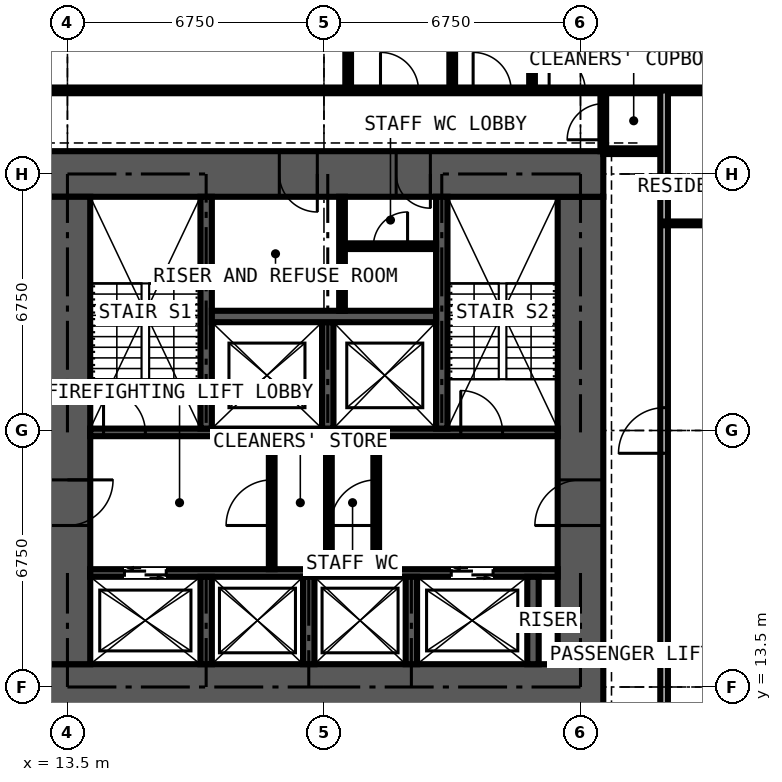
"""IFC4 building model, lengths in metres.
Left out: names, types, materials, properties, quantities, classifications, styles, units other than length and angle.
Written with IfcOpenShell. Run it as: python <this file> out.ifc"""

import sys

from ifc_helpers import new_model, si_unit, direction, frame, frame_2d, origin, place, context, subcontext, project, spatial, rectangle, extrude, element, fill, save


model = new_model("IFC4")
c1 = context("Model", 3, precision=1e-05, world=origin(), true_north=direction((0.0, 1.0)))
c2 = subcontext(c1, "Body", "Model", "MODEL_VIEW")
j1 = project(units=[si_unit("LENGTHUNIT", "METRE"), si_unit("PLANEANGLEUNIT", "RADIAN")], contexts=[c1])
p1 = place(None, origin())
s1 = spatial("IfcSite", under=j1, at=p1, CompositionType="ELEMENT")
p2 = place(p1, origin())
s2 = spatial("IfcBuilding", under=s1, at=p2, CompositionType="ELEMENT")
p3 = place(p2, frame((0.0, 0.0, 68.4)))
s3 = spatial("IfcBuildingStorey", under=s2, at=p3, CompositionType="ELEMENT", Elevation=68.4)
p4 = place(p3, frame((12.9, 13.5, 0.0), z_axis=(0.0, 0.0, 1.0), x_axis=(1.0, 0.0, 0.0)))
e1 = element("IfcWall", 1, at=p4, inside=s3, PredefinedType="SHEAR", context=c2, shape_type="SweptSolid", body=[
    extrude(rectangle(XDim=14.7, YDim=1.2, at=frame_2d((7.35, 0.0))), origin(), (0.0, 0.0, 1.0), 3.6),
])
p5 = place(p3, frame((27.0, 14.1, 0.0), z_axis=(0.0, 0.0, 1.0), x_axis=(0.0, 1.0, 0.0)))
e2 = element("IfcWall", 2, at=p5, inside=s3, PredefinedType="SHEAR", context=c2, shape_type="SweptSolid", body=[
    extrude(rectangle(XDim=12.3, YDim=1.2, at=frame_2d((6.15, 0.0))), origin(), (0.0, 0.0, 1.0), 3.6),
])
p6 = place(p5, frame((3.65, 0.0, 0.0)))
e3 = element("IfcOpeningElement", 3, at=p6, cuts=e2, PredefinedType="OPENING", context=c2, shape_type="SweptSolid", body=[
    extrude(rectangle(XDim=1.2, YDim=2.2, at=frame_2d((0.6, 1.1))), frame((0.0, 0.61, 0.0), z_axis=(0.0, -1.0, 0.0), x_axis=(1.0, 0.0, 0.0)), (0.0, 0.0, 1.0), 1.22),
])
p7 = place(p3, frame((27.6, 27.0, 0.0), z_axis=(0.0, 0.0, 1.0), x_axis=(-1.0, 0.0, 0.0)))
e4 = element("IfcWall", 4, at=p7, inside=s3, PredefinedType="SHEAR", context=c2, shape_type="SweptSolid", body=[
    extrude(rectangle(XDim=14.7, YDim=1.2, at=frame_2d((7.35, 0.0))), origin(), (0.0, 0.0, 1.0), 3.6),
])
p8 = place(p7, frame((4.55, 0.0, 0.0)))
e5 = element("IfcOpeningElement", 5, at=p8, cuts=e4, PredefinedType="OPENING", context=c2, shape_type="SweptSolid", body=[
    extrude(rectangle(XDim=0.9, YDim=2.2, at=frame_2d((0.45, 1.1))), frame((0.0, 0.61, 0.0), z_axis=(0.0, -1.0, 0.0), x_axis=(1.0, 0.0, 0.0)), (0.0, 0.0, 1.0), 1.22),
])
p9 = place(p7, frame((7.525, 0.0, 0.0)))
e6 = element("IfcOpeningElement", 6, at=p9, cuts=e4, PredefinedType="OPENING", context=c2, shape_type="SweptSolid", body=[
    extrude(rectangle(XDim=1.0, YDim=2.2, at=frame_2d((0.5, 1.1))), frame((0.0, 0.61, 0.0), z_axis=(0.0, -1.0, 0.0), x_axis=(1.0, 0.0, 0.0)), (0.0, 0.0, 1.0), 1.22),
])
p10 = place(p3, frame((13.5, 26.4, 0.0), z_axis=(0.0, 0.0, 1.0), x_axis=(0.0, -1.0, 0.0)))
e7 = element("IfcWall", 7, at=p10, inside=s3, PredefinedType="SHEAR", context=c2, shape_type="SweptSolid", body=[
    extrude(rectangle(XDim=12.3, YDim=1.2, at=frame_2d((6.15, 0.0))), origin(), (0.0, 0.0, 1.0), 3.6),
])
p11 = place(p10, frame((7.45, 0.0, 0.0)))
e8 = element("IfcOpeningElement", 8, at=p11, cuts=e7, PredefinedType="OPENING", context=c2, shape_type="SweptSolid", body=[
    extrude(rectangle(XDim=1.2, YDim=2.2, at=frame_2d((0.6, 1.1))), frame((0.0, 0.61, 0.0), z_axis=(0.0, -1.0, 0.0), x_axis=(1.0, 0.0, 0.0)), (0.0, 0.0, 1.0), 1.22),
])
p12 = place(p3, frame((14.1, 16.5, 0.0), z_axis=(0.0, 0.0, 1.0), x_axis=(1.0, 0.0, 0.0)))
e9 = element("IfcWall", 9, at=p12, inside=s3, PredefinedType="SHEAR", context=c2, shape_type="SweptSolid", body=[
    extrude(rectangle(XDim=12.3, YDim=0.2, at=frame_2d((6.15, 0.0))), origin(), (0.0, 0.0, 1.0), 3.6),
])
p13 = place(p12, frame((0.9, 0.0, 0.0)))
e10 = element("IfcOpeningElement", 10, at=p13, cuts=e9, PredefinedType="OPENING", context=c2, shape_type="SweptSolid", body=[
    extrude(rectangle(XDim=1.1, YDim=2.2, at=frame_2d((0.55, 1.1))), frame((0.0, 0.11, 0.0), z_axis=(0.0, -1.0, 0.0), x_axis=(1.0, 0.0, 0.0)), (0.0, 0.0, 1.0), 0.22),
])
p14 = place(p12, frame((9.5, 0.0, 0.0)))
e11 = element("IfcOpeningElement", 11, at=p14, cuts=e9, PredefinedType="OPENING", context=c2, shape_type="SweptSolid", body=[
    extrude(rectangle(XDim=1.1, YDim=2.2, at=frame_2d((0.55, 1.1))), frame((0.0, 0.11, 0.0), z_axis=(0.0, -1.0, 0.0), x_axis=(1.0, 0.0, 0.0)), (0.0, 0.0, 1.0), 0.22),
])
p15 = place(p3, frame((14.1, 20.2, 0.0), z_axis=(0.0, 0.0, 1.0), x_axis=(1.0, 0.0, 0.0)))
e12 = element("IfcWall", 12, at=p15, inside=s3, PredefinedType="SHEAR", context=c2, shape_type="SweptSolid", body=[
    extrude(rectangle(XDim=12.3, YDim=0.2, at=frame_2d((6.15, 0.0))), origin(), (0.0, 0.0, 1.0), 3.6),
])
p16 = place(p15, frame((0.35, 0.0, 0.0)))
e13 = element("IfcOpeningElement", 13, at=p16, cuts=e12, PredefinedType="OPENING", context=c2, shape_type="SweptSolid", body=[
    extrude(rectangle(XDim=1.1, YDim=2.2, at=frame_2d((0.55, 1.1))), frame((0.0, 0.11, 0.0), z_axis=(0.0, -1.0, 0.0), x_axis=(1.0, 0.0, 0.0)), (0.0, 0.0, 1.0), 0.22),
])
p17 = place(p15, frame((9.75, 0.0, 0.0)))
e14 = element("IfcOpeningElement", 14, at=p17, cuts=e12, PredefinedType="OPENING", context=c2, shape_type="SweptSolid", body=[
    extrude(rectangle(XDim=1.1, YDim=2.2, at=frame_2d((0.55, 1.1))), frame((0.0, 0.11, 0.0), z_axis=(0.0, -1.0, 0.0), x_axis=(1.0, 0.0, 0.0)), (0.0, 0.0, 1.0), 0.22),
])
for number, where, z_axis, x_axis in (
    (15, (17.15, 20.3, 0.0), (0.0, 0.0, 1.0), (0.0, 1.0, 0.0)),
    (16, (23.35, 20.3, 0.0), (0.0, 0.0, 1.0), (0.0, 1.0, 0.0)),
):
    element("IfcWall", number, at=place(p3, frame(where, z_axis=z_axis, x_axis=x_axis)), inside=s3, PredefinedType="SHEAR", context=c2, shape_type="SweptSolid", body=[
        extrude(rectangle(XDim=6.1, YDim=0.3, at=frame_2d((3.05, 0.0))), origin(), (0.0, 0.0, 1.0), 3.6),
    ])
p18 = place(p3, frame((20.35, 20.3, 0.0), z_axis=(0.0, 0.0, 1.0), x_axis=(0.0, 1.0, 0.0)))
e17 = element("IfcWall", 17, at=p18, inside=s3, PredefinedType="SHEAR", context=c2, shape_type="SweptSolid", body=[
    extrude(rectangle(XDim=2.8, YDim=0.3, at=frame_2d((1.4, 0.0))), origin(), (0.0, 0.0, 1.0), 3.6),
])
p19 = place(p3, frame((17.3, 23.25, 0.0), z_axis=(0.0, 0.0, 1.0), x_axis=(1.0, 0.0, 0.0)))
e18 = element("IfcWall", 18, at=p19, inside=s3, PredefinedType="SHEAR", context=c2, shape_type="SweptSolid", body=[
    extrude(rectangle(XDim=5.9, YDim=0.3, at=frame_2d((2.95, 0.0))), origin(), (0.0, 0.0, 1.0), 3.6),
])
for number, where, z_axis, x_axis in (
    (19, (17.15, 14.1, 0.0), (0.0, 0.0, 1.0), (0.0, 1.0, 0.0)),
    (20, (19.85, 14.1, 0.0), (0.0, 0.0, 1.0), (0.0, 1.0, 0.0)),
    (21, (22.55, 14.1, 0.0), (0.0, 0.0, 1.0), (0.0, 1.0, 0.0)),
    (22, (25.75, 14.1, 0.0), (0.0, 0.0, 1.0), (0.0, 1.0, 0.0)),
):
    element("IfcWall", number, at=place(p3, frame(where, z_axis=z_axis, x_axis=x_axis)), inside=s3, PredefinedType="SHEAR", context=c2, shape_type="SweptSolid", body=[
        extrude(rectangle(XDim=2.3, YDim=0.3, at=frame_2d((1.15, 0.0))), origin(), (0.0, 0.0, 1.0), 3.6),
    ])
p20 = place(p3, frame((18.875, 16.6, 0.0), z_axis=(0.0, 0.0, 1.0), x_axis=(0.0, 1.0, 0.0)))
e23 = element("IfcWall", 23, at=p20, inside=s3, PredefinedType="PARTITIONING", context=c2, shape_type="SweptSolid", body=[
    extrude(rectangle(XDim=3.5, YDim=0.15, at=frame_2d((1.75, 0.0))), origin(), (0.0, 0.0, 1.0), 3.375),
])
p21 = place(p20, frame((1.15, 0.0, 0.0)))
e24 = element("IfcOpeningElement", 24, at=p21, cuts=e23, PredefinedType="OPENING", context=c2, shape_type="SweptSolid", body=[
    extrude(rectangle(XDim=1.2, YDim=2.2, at=frame_2d((0.6, 1.1))), frame((0.0, 0.085, 0.0), z_axis=(0.0, -1.0, 0.0), x_axis=(1.0, 0.0, 0.0)), (0.0, 0.0, 1.0), 0.17),
])
p22 = place(p3, frame((21.625, 16.6, 0.0), z_axis=(0.0, 0.0, 1.0), x_axis=(0.0, 1.0, 0.0)))
e25 = element("IfcWall", 25, at=p22, inside=s3, PredefinedType="PARTITIONING", context=c2, shape_type="SweptSolid", body=[
    extrude(rectangle(XDim=3.5, YDim=0.15, at=frame_2d((1.75, 0.0))), origin(), (0.0, 0.0, 1.0), 3.375),
])
p23 = place(p22, frame((1.15, 0.0, 0.0)))
e26 = element("IfcOpeningElement", 26, at=p23, cuts=e25, PredefinedType="OPENING", context=c2, shape_type="SweptSolid", body=[
    extrude(rectangle(XDim=1.2, YDim=2.2, at=frame_2d((0.6, 1.1))), frame((0.0, 0.085, 0.0), z_axis=(0.0, -1.0, 0.0), x_axis=(1.0, 0.0, 0.0)), (0.0, 0.0, 1.0), 0.17),
])
p24 = place(p3, frame((20.38, 16.6, 0.0), z_axis=(0.0, 0.0, 1.0), x_axis=(0.0, 1.0, 0.0)))
e27 = element("IfcWall", 27, at=p24, inside=s3, PredefinedType="PARTITIONING", context=c2, shape_type="SweptSolid", body=[
    extrude(rectangle(XDim=3.5, YDim=0.15, at=frame_2d((1.75, 0.0))), origin(), (0.0, 0.0, 1.0), 3.375),
])
p25 = place(p3, frame((20.725, 23.4, 0.0), z_axis=(0.0, 0.0, 1.0), x_axis=(0.0, 1.0, 0.0)))
e28 = element("IfcWall", 28, at=p25, inside=s3, PredefinedType="PARTITIONING", context=c2, shape_type="SweptSolid", body=[
    extrude(rectangle(XDim=3.0, YDim=0.15, at=frame_2d((1.5, 0.0))), origin(), (0.0, 0.0, 1.0), 3.375),
])
p26 = place(p3, frame((20.8, 25.1, 0.0), z_axis=(0.0, 0.0, 1.0), x_axis=(1.0, 0.0, 0.0)))
e29 = element("IfcWall", 29, at=p26, inside=s3, PredefinedType="PARTITIONING", context=c2, shape_type="SweptSolid", body=[
    extrude(rectangle(XDim=2.4, YDim=0.15, at=frame_2d((1.2, 0.0))), origin(), (0.0, 0.0, 1.0), 3.375),
])
p27 = place(p26, frame((0.75, 0.0, 0.0)))
e30 = element("IfcOpeningElement", 30, at=p27, cuts=e29, PredefinedType="OPENING", context=c2, shape_type="SweptSolid", body=[
    extrude(rectangle(XDim=0.9, YDim=2.2, at=frame_2d((0.45, 1.1))), frame((0.0, 0.085, 0.0), z_axis=(0.0, -1.0, 0.0), x_axis=(1.0, 0.0, 0.0)), (0.0, 0.0, 1.0), 0.17),
])
p28 = place(p3, frame((11.3, 29.2, 0.0), z_axis=(0.0, 0.0, 1.0), x_axis=(1.0, 0.0, 0.0)))
e31 = element("IfcWall", 31, at=p28, inside=s3, PredefinedType="PARTITIONING", context=c2, shape_type="SweptSolid", body=[
    extrude(rectangle(XDim=19.075, YDim=0.15, at=frame_2d((9.538, 0.0))), origin(), (0.0, 0.0, 1.0), 3.375),
])
p29 = place(p28, frame((12.875, 0.0, 0.0)))
e32 = element("IfcOpeningElement", 32, at=p29, cuts=e31, PredefinedType="OPENING", context=c2, shape_type="SweptSolid", body=[
    extrude(rectangle(XDim=1.0, YDim=2.2, at=frame_2d((0.5, 1.1))), frame((0.0, 0.085, 0.0), z_axis=(0.0, -1.0, 0.0), x_axis=(1.0, 0.0, 0.0)), (0.0, 0.0, 1.0), 0.17),
])
p30 = place(p28, frame((10.438, 0.0, 0.0)))
e33 = element("IfcOpeningElement", 33, at=p30, cuts=e31, PredefinedType="OPENING", context=c2, shape_type="SweptSolid", body=[
    extrude(rectangle(XDim=1.0, YDim=2.2, at=frame_2d((0.5, 1.1))), frame((0.0, 0.085, 0.0), z_axis=(0.0, -1.0, 0.0), x_axis=(1.0, 0.0, 0.0)), (0.0, 0.0, 1.0), 0.17),
])
p31 = place(p28, frame((14.875, 0.0, 0.0)))
e34 = element("IfcOpeningElement", 34, at=p31, cuts=e31, PredefinedType="OPENING", context=c2, shape_type="SweptSolid", body=[
    extrude(rectangle(XDim=0.95, YDim=2.2, at=frame_2d((0.475, 1.1))), frame((0.0, 0.085, 0.0), z_axis=(0.0, -1.0, 0.0), x_axis=(1.0, 0.0, 0.0)), (0.0, 0.0, 1.0), 0.17),
])
p32 = place(p3, frame((20.887, 29.2, 0.0), z_axis=(0.0, 0.0, 1.0), x_axis=(0.0, 1.0, 0.0)))
e35 = element("IfcWall", 35, at=p32, inside=s3, PredefinedType="PARTITIONING", context=c2, shape_type="SweptSolid", body=[
    extrude(rectangle(XDim=5.65, YDim=0.15, at=frame_2d((2.825, 0.0))), origin(), (0.0, 0.0, 1.0), 3.375),
])
p33 = place(p3, frame((23.625, 29.2, 0.0), z_axis=(0.0, 0.0, 1.0), x_axis=(0.0, 1.0, 0.0)))
e36 = element("IfcWall", 36, at=p33, inside=s3, PredefinedType="PARTITIONING", context=c2, shape_type="SweptSolid", body=[
    extrude(rectangle(XDim=12.034, YDim=0.15, at=frame_2d((6.017, 0.0))), origin(), (0.0, 0.0, 1.0), 3.375),
])
p34 = place(p3, frame((25.725, 29.2, 0.0), z_axis=(0.0, 0.0, 1.0), x_axis=(0.0, 1.0, 0.0)))
e37 = element("IfcWall", 37, at=p34, inside=s3, PredefinedType="PARTITIONING", context=c2, shape_type="SweptSolid", body=[
    extrude(rectangle(XDim=5.65, YDim=0.15, at=frame_2d((2.825, 0.0))), origin(), (0.0, 0.0, 1.0), 3.375),
])
p35 = place(p3, frame((27.6, 27.6, 0.0), z_axis=(0.0, 0.0, 1.0), x_axis=(0.0, 1.0, 0.0)))
e38 = element("IfcWall", 38, at=p35, inside=s3, PredefinedType="PARTITIONING", context=c2, shape_type="SweptSolid", body=[
    extrude(rectangle(XDim=1.6, YDim=0.15, at=frame_2d((0.8, 0.0))), origin(), (0.0, 0.0, 1.0), 3.375),
])
p36 = place(p35, frame((0.3, 0.0, 0.0)))
e39 = element("IfcOpeningElement", 39, at=p36, cuts=e38, PredefinedType="OPENING", context=c2, shape_type="SweptSolid", body=[
    extrude(rectangle(XDim=0.95, YDim=2.2, at=frame_2d((0.475, 1.1))), frame((0.0, 0.085, 0.0), z_axis=(0.0, -1.0, 0.0), x_axis=(1.0, 0.0, 0.0)), (0.0, 0.0, 1.0), 0.17),
])
p37 = place(p3, frame((27.6, 27.6, 0.0), z_axis=(0.0, 0.0, 1.0), x_axis=(1.0, 0.0, 0.0)))
e40 = element("IfcWall", 40, at=p37, inside=s3, PredefinedType="PARTITIONING", context=c2, shape_type="SweptSolid", body=[
    extrude(rectangle(XDim=1.6, YDim=0.15, at=frame_2d((0.8, 0.0))), origin(), (0.0, 0.0, 1.0), 2.877),
])
p38 = place(p3, frame((29.2, 11.3, 0.0), z_axis=(0.0, 0.0, 1.0), x_axis=(0.0, 1.0, 0.0)))
e41 = element("IfcWall", 41, at=p38, inside=s3, PredefinedType="PARTITIONING", context=c2, shape_type="SweptSolid", body=[
    extrude(rectangle(XDim=17.9, YDim=0.2, at=frame_2d((8.95, 0.0))), origin(), (0.0, 0.0, 1.0), 3.375),
])
p39 = place(p38, frame((8.35, 0.0, 0.0)))
e42 = element("IfcOpeningElement", 42, at=p39, cuts=e41, PredefinedType="OPENING", context=c2, shape_type="SweptSolid", body=[
    extrude(rectangle(XDim=1.2, YDim=2.2, at=frame_2d((0.6, 1.1))), frame((0.0, 0.11, 0.0), z_axis=(0.0, -1.0, 0.0), x_axis=(1.0, 0.0, 0.0)), (0.0, 0.0, 1.0), 0.22),
])
p40 = place(p3, frame((29.2, 25.7, 0.0), z_axis=(0.0, 0.0, 1.0), x_axis=(1.0, 0.0, 0.0)))
e43 = element("IfcWall", 43, at=p40, inside=s3, PredefinedType="SHEAR", context=c2, shape_type="SweptSolid", body=[
    extrude(rectangle(XDim=3.45, YDim=0.1, at=frame_2d((1.725, 0.0))), origin(), (0.0, 0.0, 1.0), 3.375),
])
p41 = place(p13, origin())
e44 = element("IfcDoor", 44, at=p41, inside=s3, OperationType="DOUBLE_DOOR_SLIDING", PredefinedType="DOOR", context=c2, shape_type="SweptSolid", body=[
    extrude(rectangle(XDim=1.1, YDim=2.2, at=frame_2d((0.55, 1.1))), frame((0.0, 0.025, 0.0), z_axis=(0.0, -1.0, 0.0), x_axis=(1.0, 0.0, 0.0)), (0.0, 0.0, 1.0), 0.05),
])
fill(e10, e44)
p42 = place(p14, origin())
e45 = element("IfcDoor", 45, at=p42, inside=s3, OperationType="DOUBLE_DOOR_SLIDING", PredefinedType="DOOR", context=c2, shape_type="SweptSolid", body=[
    extrude(rectangle(XDim=1.1, YDim=2.2, at=frame_2d((0.55, 1.1))), frame((0.0, 0.025, 0.0), z_axis=(0.0, -1.0, 0.0), x_axis=(1.0, 0.0, 0.0)), (0.0, 0.0, 1.0), 0.05),
])
fill(e11, e45)
p43 = place(p11, origin())
e46 = element("IfcDoor", 46, at=p43, inside=s3, OperationType="DOUBLE_DOOR_SINGLE_SWING", PredefinedType="DOOR", context=c2, shape_type="SweptSolid", body=[
    extrude(rectangle(XDim=1.2, YDim=2.2, at=frame_2d((0.6, 1.1))), frame((0.0, 0.025, 0.0), z_axis=(0.0, -1.0, 0.0), x_axis=(1.0, 0.0, 0.0)), (0.0, 0.0, 1.0), 0.05),
])
fill(e8, e46)
p44 = place(p6, origin())
e47 = element("IfcDoor", 47, at=p44, inside=s3, OperationType="DOUBLE_DOOR_SINGLE_SWING", PredefinedType="DOOR", context=c2, shape_type="SweptSolid", body=[
    extrude(rectangle(XDim=1.2, YDim=2.2, at=frame_2d((0.6, 1.1))), frame((0.0, 0.025, 0.0), z_axis=(0.0, -1.0, 0.0), x_axis=(1.0, 0.0, 0.0)), (0.0, 0.0, 1.0), 0.05),
])
fill(e3, e47)
p45 = place(p21, origin())
e48 = element("IfcDoor", 48, at=p45, inside=s3, OperationType="DOUBLE_DOOR_SINGLE_SWING", PredefinedType="DOOR", context=c2, shape_type="SweptSolid", body=[
    extrude(rectangle(XDim=1.2, YDim=2.2, at=frame_2d((0.6, 1.1))), frame((0.0, 0.025, 0.0), z_axis=(0.0, -1.0, 0.0), x_axis=(1.0, 0.0, 0.0)), (0.0, 0.0, 1.0), 0.05),
])
fill(e24, e48)
p46 = place(p23, origin())
e49 = element("IfcDoor", 49, at=p46, inside=s3, OperationType="DOUBLE_DOOR_SINGLE_SWING", PredefinedType="DOOR", context=c2, shape_type="SweptSolid", body=[
    extrude(rectangle(XDim=1.2, YDim=2.2, at=frame_2d((0.6, 1.1))), frame((0.0, 0.025, 0.0), z_axis=(0.0, -1.0, 0.0), x_axis=(1.0, 0.0, 0.0)), (0.0, 0.0, 1.0), 0.05),
])
fill(e26, e49)
p47 = place(p27, origin())
e50 = element("IfcDoor", 50, at=p47, inside=s3, OperationType="SINGLE_SWING_RIGHT", PredefinedType="DOOR", context=c2, shape_type="SweptSolid", body=[
    extrude(rectangle(XDim=0.9, YDim=2.2, at=frame_2d((0.45, 1.1))), frame((0.0, 0.025, 0.0), z_axis=(0.0, -1.0, 0.0), x_axis=(1.0, 0.0, 0.0)), (0.0, 0.0, 1.0), 0.05),
])
fill(e30, e50)
p48 = place(p8, origin())
e51 = element("IfcDoor", 51, at=p48, inside=s3, OperationType="SINGLE_SWING_LEFT", PredefinedType="DOOR", context=c2, shape_type="SweptSolid", body=[
    extrude(rectangle(XDim=0.9, YDim=2.2, at=frame_2d((0.45, 1.1))), frame((0.0, 0.4, 0.0), z_axis=(0.0, -1.0, 0.0), x_axis=(1.0, 0.0, 0.0)), (0.0, 0.0, 1.0), 0.8),
])
fill(e5, e51)
p49 = place(p9, origin())
e52 = element("IfcDoor", 52, at=p49, inside=s3, OperationType="SINGLE_SWING_LEFT", PredefinedType="DOOR", context=c2, shape_type="SweptSolid", body=[
    extrude(rectangle(XDim=1.0, YDim=2.2, at=frame_2d((0.5, 1.1))), frame((0.0, 0.025, 0.0), z_axis=(0.0, -1.0, 0.0), x_axis=(1.0, 0.0, 0.0)), (0.0, 0.0, 1.0), 0.05),
])
fill(e6, e52)
p50 = place(p16, origin())
e53 = element("IfcDoor", 53, at=p50, inside=s3, OperationType="SINGLE_SWING_LEFT", PredefinedType="DOOR", context=c2, shape_type="SweptSolid", body=[
    extrude(rectangle(XDim=1.1, YDim=2.2, at=frame_2d((0.55, 1.1))), frame((0.0, 0.025, 0.0), z_axis=(0.0, -1.0, 0.0), x_axis=(1.0, 0.0, 0.0)), (0.0, 0.0, 1.0), 0.05),
])
fill(e13, e53)
p51 = place(p17, origin())
e54 = element("IfcDoor", 54, at=p51, inside=s3, OperationType="SINGLE_SWING_LEFT", PredefinedType="DOOR", context=c2, shape_type="SweptSolid", body=[
    extrude(rectangle(XDim=1.1, YDim=2.2, at=frame_2d((0.55, 1.1))), frame((0.0, 0.025, 0.0), z_axis=(0.0, -1.0, 0.0), x_axis=(1.0, 0.0, 0.0)), (0.0, 0.0, 1.0), 0.05),
])
fill(e14, e54)
p52 = place(p36, origin())
e55 = element("IfcDoor", 55, at=p52, inside=s3, OperationType="SINGLE_SWING_LEFT", PredefinedType="DOOR", context=c2, shape_type="SweptSolid", body=[
    extrude(rectangle(XDim=0.95, YDim=2.2, at=frame_2d((0.475, 1.1))), frame((0.0, 0.025, 0.0), z_axis=(0.0, -1.0, 0.0), x_axis=(1.0, 0.0, 0.0)), (0.0, 0.0, 1.0), 0.05),
])
fill(e39, e55)
p53 = place(p29, origin())
e56 = element("IfcDoor", 56, at=p53, inside=s3, OperationType="SINGLE_SWING_LEFT", PredefinedType="DOOR", context=c2, shape_type="SweptSolid", body=[
    extrude(rectangle(XDim=1.0, YDim=2.2, at=frame_2d((0.5, 1.1))), frame((0.0, 0.025, 0.0), z_axis=(0.0, -1.0, 0.0), x_axis=(1.0, 0.0, 0.0)), (0.0, 0.0, 1.0), 0.05),
])
fill(e32, e56)
p54 = place(p30, origin())
e57 = element("IfcDoor", 57, at=p54, inside=s3, OperationType="SINGLE_SWING_LEFT", PredefinedType="DOOR", context=c2, shape_type="SweptSolid", body=[
    extrude(rectangle(XDim=1.0, YDim=2.2, at=frame_2d((0.5, 1.1))), frame((0.0, 0.025, 0.0), z_axis=(0.0, -1.0, 0.0), x_axis=(1.0, 0.0, 0.0)), (0.0, 0.0, 1.0), 0.05),
])
fill(e33, e57)
p55 = place(p31, origin())
e58 = element("IfcDoor", 58, at=p55, inside=s3, OperationType="SINGLE_SWING_LEFT", PredefinedType="DOOR", context=c2, shape_type="SweptSolid", body=[
    extrude(rectangle(XDim=0.95, YDim=2.2, at=frame_2d((0.475, 1.1))), frame((0.0, 0.025, 0.0), z_axis=(0.0, -1.0, 0.0), x_axis=(1.0, 0.0, 0.0)), (0.0, 0.0, 1.0), 0.05),
])
fill(e34, e58)
p56 = place(p39, origin())
e59 = element("IfcDoor", 59, at=p56, inside=s3, OperationType="DOUBLE_DOOR_SINGLE_SWING", PredefinedType="DOOR", context=c2, shape_type="SweptSolid", body=[
    extrude(rectangle(XDim=1.2, YDim=2.2, at=frame_2d((0.6, 1.1))), frame((0.0, 0.025, 0.0), z_axis=(0.0, -1.0, 0.0), x_axis=(1.0, 0.0, 0.0)), (0.0, 0.0, 1.0), 0.05),
])
fill(e42, e59)
save(model, sys.argv[1])
